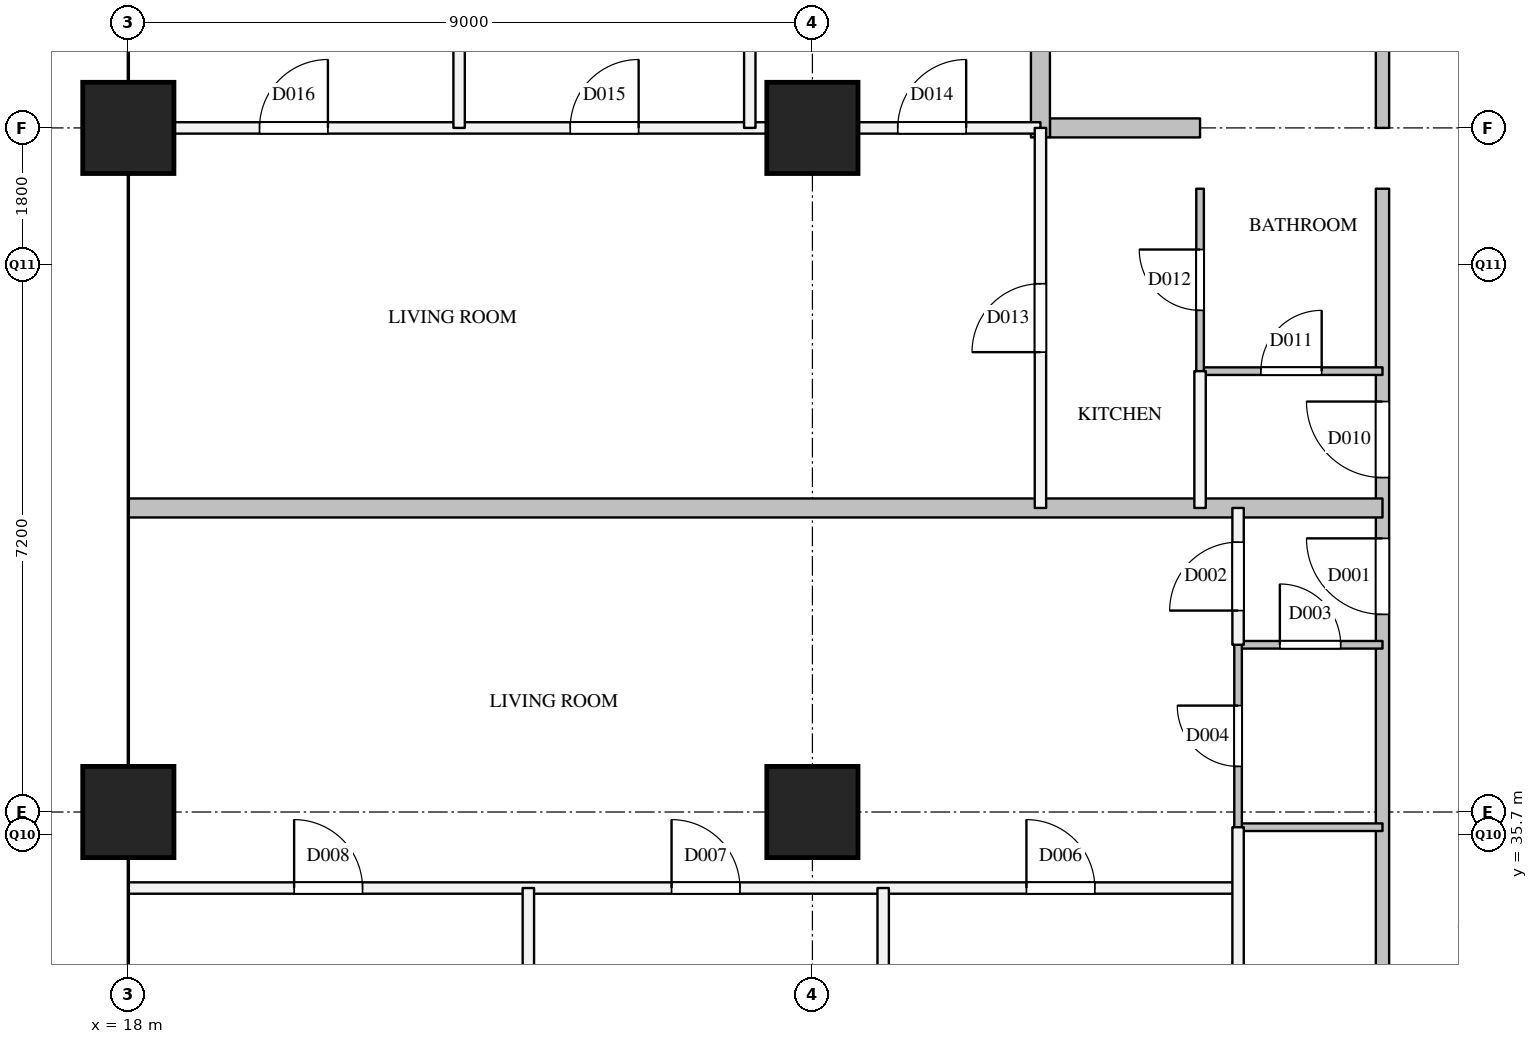
"""IFC4 building model, lengths in metres.
Left out: names, types, materials, properties, quantities, classifications, styles, units other than length and angle.
Written with IfcOpenShell. Run it as: python <this file> out.ifc"""

import sys

from ifc_helpers import new_model, si_unit, direction, frame, frame_2d, origin, origin_2d, place, context, subcontext, project, spatial, rectangle, extrude, element, fill, save


model = new_model("IFC4")
c1 = context("Model", 3, precision=1e-05, world=origin(), true_north=direction((0.0, 1.0)))
c2 = subcontext(c1, "Body", "Model", "MODEL_VIEW")
j1 = project(units=[si_unit("LENGTHUNIT", "METRE"), si_unit("PLANEANGLEUNIT", "RADIAN")], contexts=[c1])
p1 = place(None, origin())
s1 = spatial("IfcSite", under=j1, at=p1, CompositionType="ELEMENT")
p2 = place(p1, origin())
s2 = spatial("IfcBuilding", under=s1, at=p2, CompositionType="ELEMENT")
p3 = place(p2, frame((0.0, 0.0, 246.2)))
s3 = spatial("IfcBuildingStorey", under=s2, at=p3, CompositionType="ELEMENT", Elevation=246.2)
for number, where, z_axis, x_axis in (
    (1, (18.0, 36.0, 0.0), (0.0, 0.0, 1.0), (1.0, 0.0, 0.0)),
    (2, (18.0, 45.0, 0.0), (0.0, 0.0, 1.0), (1.0, 0.0, 0.0)),
    (3, (27.0, 36.0, 0.0), (0.0, 0.0, 1.0), (1.0, 0.0, 0.0)),
    (4, (27.0, 45.0, 0.0), (0.0, 0.0, 1.0), (1.0, 0.0, 0.0)),
):
    element("IfcColumn", number, at=place(p3, frame(where, z_axis=z_axis, x_axis=x_axis)), inside=s3, PredefinedType="COLUMN", context=c2, shape_type="SweptSolid", body=[
        extrude(rectangle(XDim=1.2, YDim=1.2, at=origin_2d()), origin(), (0.0, 0.0, 1.0), 3.9),
    ])
p4 = place(p3, frame((34.5, 28.5, 0.0), z_axis=(0.0, 0.0, 1.0), x_axis=(0.0, 1.0, 0.0)))
e5 = element("IfcWall", 5, at=p4, inside=s3, PredefinedType="PARTITIONING", context=c2, shape_type="SweptSolid", body=[
    extrude(rectangle(XDim=15.7, YDim=0.175, at=frame_2d((7.85, 0.0))), origin(), (0.0, 0.0, 1.0), 3.6),
])
p5 = place(p4, frame((10.1, 0.0, 0.0)))
e6 = element("IfcOpeningElement", 6, at=p5, cuts=e5, PredefinedType="OPENING", context=c2, shape_type="SweptSolid", body=[
    extrude(rectangle(XDim=1.0, YDim=2.1, at=frame_2d((0.5, 1.05))), frame((0.0, 0.097, 0.0), z_axis=(0.0, -1.0, 0.0), x_axis=(1.0, 0.0, 0.0)), (0.0, 0.0, 1.0), 0.195),
])
p6 = place(p4, frame((11.9, 0.0, 0.0)))
e7 = element("IfcOpeningElement", 7, at=p6, cuts=e5, PredefinedType="OPENING", context=c2, shape_type="SweptSolid", body=[
    extrude(rectangle(XDim=1.0, YDim=2.1, at=frame_2d((0.5, 1.05))), frame((0.0, 0.097, 0.0), z_axis=(0.0, -1.0, 0.0), x_axis=(1.0, 0.0, 0.0)), (0.0, 0.0, 1.0), 0.195),
])
p7 = place(p3, frame((34.5, 45.0, 0.0), z_axis=(0.0, 0.0, 1.0), x_axis=(0.0, 1.0, 0.0)))
e8 = element("IfcWall", 8, at=p7, inside=s3, PredefinedType="PARTITIONING", context=c2, shape_type="SweptSolid", body=[
    extrude(rectangle(XDim=6.5, YDim=0.175, at=frame_2d((3.25, 0.0))), origin(), (0.0, 0.0, 1.0), 3.6),
])
p8 = place(p7, frame((2.8, 0.0, 0.0)))
e9 = element("IfcOpeningElement", 9, at=p8, cuts=e8, PredefinedType="OPENING", context=c2, shape_type="SweptSolid", body=[
    extrude(rectangle(XDim=0.9, YDim=2.1, at=frame_2d((0.45, 1.05))), frame((0.0, 0.097, 0.0), z_axis=(0.0, -1.0, 0.0), x_axis=(1.0, 0.0, 0.0)), (0.0, 0.0, 1.0), 0.195),
])
p9 = place(p3, frame((18.0, 35.0, 0.0), z_axis=(0.0, 0.0, 1.0), x_axis=(1.0, 0.0, 0.0)))
e10 = element("IfcWall", 10, at=p9, inside=s3, PredefinedType="PARTITIONING", context=c2, shape_type="SweptSolid", body=[
    extrude(rectangle(XDim=14.6, YDim=0.15, at=frame_2d((7.3, 0.0))), origin(), (0.0, 0.0, 1.0), 2.6),
])
p10 = place(p9, frame((11.816, 0.0, 0.0)))
e11 = element("IfcOpeningElement", 11, at=p10, cuts=e10, PredefinedType="OPENING", context=c2, shape_type="SweptSolid", body=[
    extrude(rectangle(XDim=0.9, YDim=2.1, at=frame_2d((0.45, 1.05))), frame((0.0, 0.085, 0.0), z_axis=(0.0, -1.0, 0.0), x_axis=(1.0, 0.0, 0.0)), (0.0, 0.0, 1.0), 0.17),
])
p11 = place(p9, frame((7.147, 0.0, 0.0)))
e12 = element("IfcOpeningElement", 12, at=p11, cuts=e10, PredefinedType="OPENING", context=c2, shape_type="SweptSolid", body=[
    extrude(rectangle(XDim=0.9, YDim=2.1, at=frame_2d((0.45, 1.05))), frame((0.0, 0.085, 0.0), z_axis=(0.0, -1.0, 0.0), x_axis=(1.0, 0.0, 0.0)), (0.0, 0.0, 1.0), 0.17),
])
p12 = place(p9, frame((2.181, 0.0, 0.0)))
e13 = element("IfcOpeningElement", 13, at=p12, cuts=e10, PredefinedType="OPENING", context=c2, shape_type="SweptSolid", body=[
    extrude(rectangle(XDim=0.9, YDim=2.1, at=frame_2d((0.45, 1.05))), frame((0.0, 0.085, 0.0), z_axis=(0.0, -1.0, 0.0), x_axis=(1.0, 0.0, 0.0)), (0.0, 0.0, 1.0), 0.17),
])
p13 = place(p3, frame((18.0, 45.0, 0.0), z_axis=(0.0, 0.0, 1.0), x_axis=(1.0, 0.0, 0.0)))
e14 = element("IfcWall", 14, at=p13, inside=s3, PredefinedType="PARTITIONING", context=c2, shape_type="SweptSolid", body=[
    extrude(rectangle(XDim=12.0, YDim=0.15, at=frame_2d((6.0, 0.0))), origin(), (0.0, 0.0, 1.0), 3.6),
])
p14 = place(p13, frame((10.123, 0.0, 0.0)))
e15 = element("IfcOpeningElement", 15, at=p14, cuts=e14, PredefinedType="OPENING", context=c2, shape_type="SweptSolid", body=[
    extrude(rectangle(XDim=0.9, YDim=2.1, at=frame_2d((0.45, 1.05))), frame((0.0, 0.085, 0.0), z_axis=(0.0, -1.0, 0.0), x_axis=(1.0, 0.0, 0.0)), (0.0, 0.0, 1.0), 0.17),
])
p15 = place(p13, frame((5.814, 0.0, 0.0)))
e16 = element("IfcOpeningElement", 16, at=p15, cuts=e14, PredefinedType="OPENING", context=c2, shape_type="SweptSolid", body=[
    extrude(rectangle(XDim=0.9, YDim=2.1, at=frame_2d((0.45, 1.05))), frame((0.0, 0.085, 0.0), z_axis=(0.0, -1.0, 0.0), x_axis=(1.0, 0.0, 0.0)), (0.0, 0.0, 1.0), 0.17),
])
p16 = place(p13, frame((1.726, 0.0, 0.0)))
e17 = element("IfcOpeningElement", 17, at=p16, cuts=e14, PredefinedType="OPENING", context=c2, shape_type="SweptSolid", body=[
    extrude(rectangle(XDim=0.9, YDim=2.1, at=frame_2d((0.45, 1.05))), frame((0.0, 0.085, 0.0), z_axis=(0.0, -1.0, 0.0), x_axis=(1.0, 0.0, 0.0)), (0.0, 0.0, 1.0), 0.17),
])
p17 = place(p3, frame((22.352, 45.0, 0.0), z_axis=(0.0, 0.0, 1.0), x_axis=(0.0, 1.0, 0.0)))
e18 = element("IfcWall", 18, at=p17, inside=s3, PredefinedType="PARTITIONING", context=c2, shape_type="SweptSolid", body=[
    extrude(rectangle(XDim=8.97, YDim=0.15, at=frame_2d((4.485, 0.0))), origin(), (0.0, 0.0, 1.0), 2.6),
])
p18 = place(p3, frame((23.263, 27.0, 0.0), z_axis=(0.0, 0.0, 1.0), x_axis=(0.0, 1.0, 0.0)))
e19 = element("IfcWall", 19, at=p18, inside=s3, PredefinedType="PARTITIONING", context=c2, shape_type="SweptSolid", body=[
    extrude(rectangle(XDim=8.0, YDim=0.15, at=frame_2d((4.0, 0.0))), origin(), (0.0, 0.0, 1.0), 2.6),
])
p19 = place(p3, frame((26.176, 45.0, 0.0), z_axis=(0.0, 0.0, 1.0), x_axis=(0.0, 1.0, 0.0)))
e20 = element("IfcWall", 20, at=p19, inside=s3, PredefinedType="PARTITIONING", context=c2, shape_type="SweptSolid", body=[
    extrude(rectangle(XDim=9.0, YDim=0.15, at=frame_2d((4.5, 0.0))), origin(), (0.0, 0.0, 1.0), 2.6),
])
p20 = place(p3, frame((27.931, 27.0, 0.0), z_axis=(0.0, 0.0, 1.0), x_axis=(0.0, 1.0, 0.0)))
e21 = element("IfcWall", 21, at=p20, inside=s3, PredefinedType="PARTITIONING", context=c2, shape_type="SweptSolid", body=[
    extrude(rectangle(XDim=8.0, YDim=0.15, at=frame_2d((4.0, 0.0))), origin(), (0.0, 0.0, 1.0), 2.6),
])
p21 = place(p3, frame((30.0, 40.0, 0.0), z_axis=(0.0, 0.0, 1.0), x_axis=(0.0, 1.0, 0.0)))
e22 = element("IfcWall", 22, at=p21, inside=s3, PredefinedType="PARTITIONING", context=c2, shape_type="SweptSolid", body=[
    extrude(rectangle(XDim=5.0, YDim=0.15, at=frame_2d((2.5, 0.0))), origin(), (0.0, 0.0, 1.0), 3.6),
])
p22 = place(p21, frame((2.05, 0.0, 0.0)))
e23 = element("IfcOpeningElement", 23, at=p22, cuts=e22, PredefinedType="OPENING", context=c2, shape_type="SweptSolid", body=[
    extrude(rectangle(XDim=0.9, YDim=2.1, at=frame_2d((0.45, 1.05))), frame((0.0, 0.085, 0.0), z_axis=(0.0, -1.0, 0.0), x_axis=(1.0, 0.0, 0.0)), (0.0, 0.0, 1.0), 0.17),
])
p23 = place(p3, frame((32.1, 40.0, 0.0), z_axis=(0.0, 0.0, 1.0), x_axis=(0.0, 1.0, 0.0)))
e24 = element("IfcWall", 24, at=p23, inside=s3, PredefinedType="PARTITIONING", context=c2, shape_type="SweptSolid", body=[
    extrude(rectangle(XDim=1.8, YDim=0.15, at=frame_2d((0.9, 0.0))), origin(), (0.0, 0.0, 1.0), 3.6),
])
p24 = place(p3, frame((32.6, 27.0, 0.0), z_axis=(0.0, 0.0, 1.0), x_axis=(0.0, 1.0, 0.0)))
e25 = element("IfcWall", 25, at=p24, inside=s3, PredefinedType="PARTITIONING", context=c2, shape_type="SweptSolid", body=[
    extrude(rectangle(XDim=8.8, YDim=0.15, at=frame_2d((4.4, 0.0))), origin(), (0.0, 0.0, 1.0), 2.6),
])
p25 = place(p24, frame((3.55, 0.0, 0.0)))
e26 = element("IfcOpeningElement", 26, at=p25, cuts=e25, PredefinedType="OPENING", context=c2, shape_type="SweptSolid", body=[
    extrude(rectangle(XDim=0.9, YDim=2.1, at=frame_2d((0.45, 1.05))), frame((0.0, 0.085, 0.0), z_axis=(0.0, -1.0, 0.0), x_axis=(1.0, 0.0, 0.0)), (0.0, 0.0, 1.0), 0.17),
])
p26 = place(p3, frame((32.6, 38.2, 0.0), z_axis=(0.0, 0.0, 1.0), x_axis=(0.0, 1.0, 0.0)))
e27 = element("IfcWall", 27, at=p26, inside=s3, PredefinedType="PARTITIONING", context=c2, shape_type="SweptSolid", body=[
    extrude(rectangle(XDim=1.8, YDim=0.15, at=frame_2d((0.9, 0.0))), origin(), (0.0, 0.0, 1.0), 3.6),
])
p27 = place(p26, frame((0.45, 0.0, 0.0)))
e28 = element("IfcOpeningElement", 28, at=p27, cuts=e27, PredefinedType="OPENING", context=c2, shape_type="SweptSolid", body=[
    extrude(rectangle(XDim=0.9, YDim=2.1, at=frame_2d((0.45, 1.05))), frame((0.0, 0.085, 0.0), z_axis=(0.0, -1.0, 0.0), x_axis=(1.0, 0.0, 0.0)), (0.0, 0.0, 1.0), 0.17),
])
p28 = place(p3, frame((18.0, 40.0, 0.0), z_axis=(0.0, 0.0, 1.0), x_axis=(1.0, 0.0, 0.0)))
e29 = element("IfcWall", 29, at=p28, inside=s3, PredefinedType="PARTITIONING", context=c2, shape_type="SweptSolid", body=[
    extrude(rectangle(XDim=16.5, YDim=0.25, at=frame_2d((8.25, 0.0))), origin(), (0.0, 0.0, 1.0), 2.6),
])
p29 = place(p3, frame((30.125, 45.0, 0.0), z_axis=(0.0, 0.0, 1.0), x_axis=(1.0, 0.0, 0.0)))
e30 = element("IfcWall", 30, at=p29, inside=s3, PredefinedType="PARTITIONING", context=c2, shape_type="SweptSolid", body=[
    extrude(rectangle(XDim=1.975, YDim=0.25, at=frame_2d((0.988, 0.0))), origin(), (0.0, 0.0, 1.0), 3.6),
])
p30 = place(p3, frame((30.0, 44.875, 0.0), z_axis=(0.0, 0.0, 1.0), x_axis=(0.0, 1.0, 0.0)))
e31 = element("IfcWall", 31, at=p30, inside=s3, PredefinedType="PARTITIONING", context=c2, shape_type="SweptSolid", body=[
    extrude(rectangle(XDim=9.125, YDim=0.25, at=frame_2d((4.562, 0.0))), origin(), (0.0, 0.0, 1.0), 2.6),
])
p31 = place(p3, frame((32.6, 35.8, 0.0), z_axis=(0.0, 0.0, 1.0), x_axis=(1.0, 0.0, 0.0)))
e32 = element("IfcWall", 32, at=p31, inside=s3, PredefinedType="PARTITIONING", context=c2, shape_type="SweptSolid", body=[
    extrude(rectangle(XDim=1.9, YDim=0.1, at=frame_2d((0.95, 0.0))), origin(), (0.0, 0.0, 1.0), 3.6),
])
p32 = place(p3, frame((32.6, 38.2, 0.0), z_axis=(0.0, 0.0, 1.0), x_axis=(1.0, 0.0, 0.0)))
e33 = element("IfcWall", 33, at=p32, inside=s3, PredefinedType="PARTITIONING", context=c2, shape_type="SweptSolid", body=[
    extrude(rectangle(XDim=1.9, YDim=0.1, at=frame_2d((0.95, 0.0))), origin(), (0.0, 0.0, 1.0), 3.6),
])
p33 = place(p32, frame((0.55, 0.0, 0.0)))
e34 = element("IfcOpeningElement", 34, at=p33, cuts=e33, PredefinedType="OPENING", context=c2, shape_type="SweptSolid", body=[
    extrude(rectangle(XDim=0.8, YDim=2.1, at=frame_2d((0.4, 1.05))), frame((0.0, 0.06, 0.0), z_axis=(0.0, -1.0, 0.0), x_axis=(1.0, 0.0, 0.0)), (0.0, 0.0, 1.0), 0.12),
])
p34 = place(p3, frame((32.1, 41.8, 0.0), z_axis=(0.0, 0.0, 1.0), x_axis=(1.0, 0.0, 0.0)))
e35 = element("IfcWall", 35, at=p34, inside=s3, PredefinedType="PARTITIONING", context=c2, shape_type="SweptSolid", body=[
    extrude(rectangle(XDim=2.4, YDim=0.1, at=frame_2d((1.2, 0.0))), origin(), (0.0, 0.0, 1.0), 3.6),
])
p35 = place(p34, frame((0.8, 0.0, 0.0)))
e36 = element("IfcOpeningElement", 36, at=p35, cuts=e35, PredefinedType="OPENING", context=c2, shape_type="SweptSolid", body=[
    extrude(rectangle(XDim=0.8, YDim=2.1, at=frame_2d((0.4, 1.05))), frame((0.0, 0.06, 0.0), z_axis=(0.0, -1.0, 0.0), x_axis=(1.0, 0.0, 0.0)), (0.0, 0.0, 1.0), 0.12),
])
p36 = place(p3, frame((32.1, 41.8, 0.0), z_axis=(0.0, 0.0, 1.0), x_axis=(0.0, 1.0, 0.0)))
e37 = element("IfcWall", 37, at=p36, inside=s3, PredefinedType="PARTITIONING", context=c2, shape_type="SweptSolid", body=[
    extrude(rectangle(XDim=2.4, YDim=0.1, at=frame_2d((1.2, 0.0))), origin(), (0.0, 0.0, 1.0), 3.6),
])
p37 = place(p36, frame((0.8, 0.0, 0.0)))
e38 = element("IfcOpeningElement", 38, at=p37, cuts=e37, PredefinedType="OPENING", context=c2, shape_type="SweptSolid", body=[
    extrude(rectangle(XDim=0.8, YDim=2.1, at=frame_2d((0.4, 1.05))), frame((0.0, 0.06, 0.0), z_axis=(0.0, -1.0, 0.0), x_axis=(1.0, 0.0, 0.0)), (0.0, 0.0, 1.0), 0.12),
])
p38 = place(p3, frame((32.6, 35.8, 0.0), z_axis=(0.0, 0.0, 1.0), x_axis=(0.0, 1.0, 0.0)))
e39 = element("IfcWall", 39, at=p38, inside=s3, PredefinedType="PARTITIONING", context=c2, shape_type="SweptSolid", body=[
    extrude(rectangle(XDim=2.4, YDim=0.1, at=frame_2d((1.2, 0.0))), origin(), (0.0, 0.0, 1.0), 3.6),
])
p39 = place(p38, frame((0.8, 0.0, 0.0)))
e40 = element("IfcOpeningElement", 40, at=p39, cuts=e39, PredefinedType="OPENING", context=c2, shape_type="SweptSolid", body=[
    extrude(rectangle(XDim=0.8, YDim=2.1, at=frame_2d((0.4, 1.05))), frame((0.0, 0.06, 0.0), z_axis=(0.0, -1.0, 0.0), x_axis=(1.0, 0.0, 0.0)), (0.0, 0.0, 1.0), 0.12),
])
p40 = place(p5, origin())
e41 = element("IfcDoor", 41, at=p40, inside=s3, OperationType="SINGLE_SWING_RIGHT", PredefinedType="DOOR", context=c2, shape_type="SweptSolid", body=[
    extrude(rectangle(XDim=1.0, YDim=2.1, at=frame_2d((0.5, 1.05))), frame((0.0, 0.025, 0.0), z_axis=(0.0, -1.0, 0.0), x_axis=(1.0, 0.0, 0.0)), (0.0, 0.0, 1.0), 0.05),
])
fill(e6, e41)
p41 = place(p27, origin())
e42 = element("IfcDoor", 42, at=p41, inside=s3, OperationType="SINGLE_SWING_LEFT", PredefinedType="DOOR", context=c2, shape_type="SweptSolid", body=[
    extrude(rectangle(XDim=0.9, YDim=2.1, at=frame_2d((0.45, 1.05))), frame((0.0, 0.025, 0.0), z_axis=(0.0, -1.0, 0.0), x_axis=(1.0, 0.0, 0.0)), (0.0, 0.0, 1.0), 0.05),
])
fill(e28, e42)
p42 = place(p33, origin())
e43 = element("IfcDoor", 43, at=p42, inside=s3, OperationType="SINGLE_SWING_LEFT", PredefinedType="DOOR", context=c2, shape_type="SweptSolid", body=[
    extrude(rectangle(XDim=0.8, YDim=2.1, at=frame_2d((0.4, 1.05))), frame((0.0, 0.025, 0.0), z_axis=(0.0, -1.0, 0.0), x_axis=(1.0, 0.0, 0.0)), (0.0, 0.0, 1.0), 0.05),
])
fill(e34, e43)
p43 = place(p39, origin())
e44 = element("IfcDoor", 44, at=p43, inside=s3, OperationType="SINGLE_SWING_RIGHT", PredefinedType="DOOR", context=c2, shape_type="SweptSolid", body=[
    extrude(rectangle(XDim=0.8, YDim=2.1, at=frame_2d((0.4, 1.05))), frame((0.0, 0.025, 0.0), z_axis=(0.0, -1.0, 0.0), x_axis=(1.0, 0.0, 0.0)), (0.0, 0.0, 1.0), 0.05),
])
fill(e40, e44)
p44 = place(p10, origin())
e45 = element("IfcDoor", 45, at=p44, inside=s3, OperationType="SINGLE_SWING_LEFT", PredefinedType="DOOR", context=c2, shape_type="SweptSolid", body=[
    extrude(rectangle(XDim=0.9, YDim=2.1, at=frame_2d((0.45, 1.05))), frame((0.0, 0.025, 0.0), z_axis=(0.0, -1.0, 0.0), x_axis=(1.0, 0.0, 0.0)), (0.0, 0.0, 1.0), 0.05),
])
fill(e11, e45)
p45 = place(p11, origin())
e46 = element("IfcDoor", 46, at=p45, inside=s3, OperationType="SINGLE_SWING_LEFT", PredefinedType="DOOR", context=c2, shape_type="SweptSolid", body=[
    extrude(rectangle(XDim=0.9, YDim=2.1, at=frame_2d((0.45, 1.05))), frame((0.0, 0.025, 0.0), z_axis=(0.0, -1.0, 0.0), x_axis=(1.0, 0.0, 0.0)), (0.0, 0.0, 1.0), 0.05),
])
fill(e12, e46)
p46 = place(p12, origin())
e47 = element("IfcDoor", 47, at=p46, inside=s3, OperationType="SINGLE_SWING_LEFT", PredefinedType="DOOR", context=c2, shape_type="SweptSolid", body=[
    extrude(rectangle(XDim=0.9, YDim=2.1, at=frame_2d((0.45, 1.05))), frame((0.0, 0.025, 0.0), z_axis=(0.0, -1.0, 0.0), x_axis=(1.0, 0.0, 0.0)), (0.0, 0.0, 1.0), 0.05),
])
fill(e13, e47)
p47 = place(p6, origin())
e48 = element("IfcDoor", 48, at=p47, inside=s3, OperationType="SINGLE_SWING_RIGHT", PredefinedType="DOOR", context=c2, shape_type="SweptSolid", body=[
    extrude(rectangle(XDim=1.0, YDim=2.1, at=frame_2d((0.5, 1.05))), frame((0.0, 0.025, 0.0), z_axis=(0.0, -1.0, 0.0), x_axis=(1.0, 0.0, 0.0)), (0.0, 0.0, 1.0), 0.05),
])
fill(e7, e48)
p48 = place(p35, origin())
e49 = element("IfcDoor", 49, at=p48, inside=s3, OperationType="SINGLE_SWING_RIGHT", PredefinedType="DOOR", context=c2, shape_type="SweptSolid", body=[
    extrude(rectangle(XDim=0.8, YDim=2.1, at=frame_2d((0.4, 1.05))), frame((0.0, 0.025, 0.0), z_axis=(0.0, -1.0, 0.0), x_axis=(1.0, 0.0, 0.0)), (0.0, 0.0, 1.0), 0.05),
])
fill(e36, e49)
p49 = place(p37, origin())
e50 = element("IfcDoor", 50, at=p49, inside=s3, OperationType="SINGLE_SWING_RIGHT", PredefinedType="DOOR", context=c2, shape_type="SweptSolid", body=[
    extrude(rectangle(XDim=0.8, YDim=2.1, at=frame_2d((0.4, 1.05))), frame((0.0, 0.025, 0.0), z_axis=(0.0, -1.0, 0.0), x_axis=(1.0, 0.0, 0.0)), (0.0, 0.0, 1.0), 0.05),
])
fill(e38, e50)
p50 = place(p22, origin())
e51 = element("IfcDoor", 51, at=p50, inside=s3, OperationType="SINGLE_SWING_LEFT", PredefinedType="DOOR", context=c2, shape_type="SweptSolid", body=[
    extrude(rectangle(XDim=0.9, YDim=2.1, at=frame_2d((0.45, 1.05))), frame((0.0, 0.025, 0.0), z_axis=(0.0, -1.0, 0.0), x_axis=(1.0, 0.0, 0.0)), (0.0, 0.0, 1.0), 0.05),
])
fill(e23, e51)
p51 = place(p14, origin())
e52 = element("IfcDoor", 52, at=p51, inside=s3, OperationType="SINGLE_SWING_RIGHT", PredefinedType="DOOR", context=c2, shape_type="SweptSolid", body=[
    extrude(rectangle(XDim=0.9, YDim=2.1, at=frame_2d((0.45, 1.05))), frame((0.0, 0.025, 0.0), z_axis=(0.0, -1.0, 0.0), x_axis=(1.0, 0.0, 0.0)), (0.0, 0.0, 1.0), 0.05),
])
fill(e15, e52)
p52 = place(p15, origin())
e53 = element("IfcDoor", 53, at=p52, inside=s3, OperationType="SINGLE_SWING_RIGHT", PredefinedType="DOOR", context=c2, shape_type="SweptSolid", body=[
    extrude(rectangle(XDim=0.9, YDim=2.1, at=frame_2d((0.45, 1.05))), frame((0.0, 0.025, 0.0), z_axis=(0.0, -1.0, 0.0), x_axis=(1.0, 0.0, 0.0)), (0.0, 0.0, 1.0), 0.05),
])
fill(e16, e53)
p53 = place(p16, origin())
e54 = element("IfcDoor", 54, at=p53, inside=s3, OperationType="SINGLE_SWING_RIGHT", PredefinedType="DOOR", context=c2, shape_type="SweptSolid", body=[
    extrude(rectangle(XDim=0.9, YDim=2.1, at=frame_2d((0.45, 1.05))), frame((0.0, 0.025, 0.0), z_axis=(0.0, -1.0, 0.0), x_axis=(1.0, 0.0, 0.0)), (0.0, 0.0, 1.0), 0.05),
])
fill(e17, e54)
save(model, sys.argv[1])
